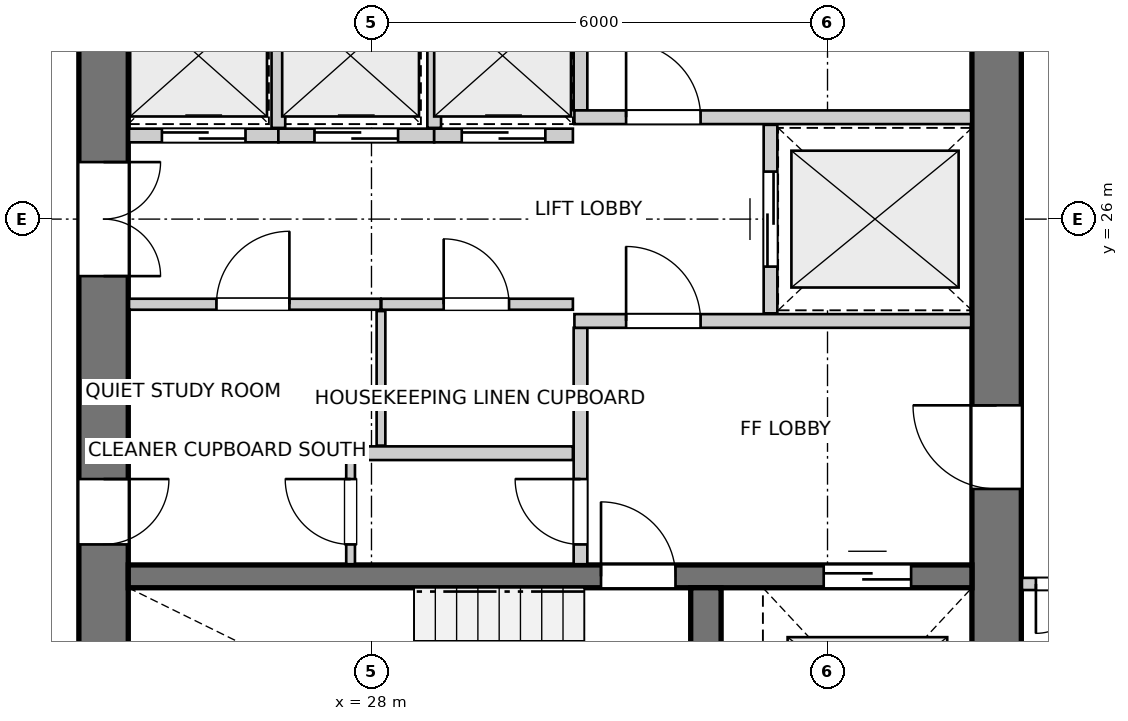
"""IFC4 building model, lengths in metres.
Left out: names, types, materials, properties, quantities, classifications, styles, units other than length and angle.
Written with IfcOpenShell. Run it as: python <this file> out.ifc"""

import sys

from ifc_helpers import new_model, si_unit, direction, frame, frame_2d, origin, place, context, subcontext, project, spatial, rectangle, extrude, source, transform, mapped, element, fill, save


model = new_model("IFC4")
c1 = context("Model", 3, precision=1e-05, world=origin(), true_north=direction((0.0, 1.0)))
c2 = subcontext(c1, "Body", "Model", "MODEL_VIEW")
j1 = project(units=[si_unit("LENGTHUNIT", "METRE"), si_unit("PLANEANGLEUNIT", "RADIAN")], contexts=[c1])
p1 = place(None, origin())
s1 = spatial("IfcSite", under=j1, at=p1, CompositionType="ELEMENT")
p2 = place(p1, origin())
s2 = spatial("IfcBuilding", under=s1, at=p2, CompositionType="ELEMENT")
p3 = place(p2, frame((0.0, 0.0, 145.8)))
s3 = spatial("IfcBuildingStorey", under=s2, at=p3, CompositionType="ELEMENT", Elevation=145.8)
p4 = place(p3, frame((24.475, 33.8, 0.0), z_axis=(0.0, 0.0, 1.0), x_axis=(0.0, -1.0, 0.0)))
e1 = element("IfcWall", 1, at=p4, inside=s3, PredefinedType="SHEAR", context=c2, shape_type="SweptSolid", body=[
    extrude(rectangle(XDim=15.6, YDim=0.65, at=frame_2d((7.8, 0.0))), origin(), (0.0, 0.0, 1.0), 2.95),
])
p5 = place(p4, frame((7.05, 0.0, 0.0)))
e2 = element("IfcOpeningElement", 2, at=p5, cuts=e1, PredefinedType="OPENING", context=c2, shape_type="SweptSolid", body=[
    extrude(rectangle(XDim=1.5, YDim=2.15, at=frame_2d((0.75, 1.075))), frame((0.0, 0.335, 0.0), z_axis=(0.0, -1.0, 0.0), x_axis=(1.0, 0.0, 0.0)), (0.0, 0.0, 1.0), 0.67),
])
p6 = place(p4, frame((3.52, 0.0, 0.0)))
e3 = element("IfcOpeningElement", 3, at=p6, cuts=e1, PredefinedType="OPENING", context=c2, shape_type="SweptSolid", body=[
    extrude(rectangle(XDim=0.86, YDim=2.05, at=frame_2d((0.43, 1.025))), frame((0.0, 0.335, 0.0), z_axis=(0.0, -1.0, 0.0), x_axis=(1.0, 0.0, 0.0)), (0.0, 0.0, 1.0), 0.67),
])
p7 = place(p4, frame((11.22, 0.0, 0.0)))
e4 = element("IfcOpeningElement", 4, at=p7, cuts=e1, PredefinedType="OPENING", context=c2, shape_type="SweptSolid", body=[
    extrude(rectangle(XDim=0.86, YDim=2.05, at=frame_2d((0.43, 1.025))), frame((0.0, 0.335, 0.0), z_axis=(0.0, -1.0, 0.0), x_axis=(1.0, 0.0, 0.0)), (0.0, 0.0, 1.0), 0.67),
])
p8 = place(p3, frame((36.225, 18.2, 0.0), z_axis=(0.0, 0.0, 1.0), x_axis=(0.0, 1.0, 0.0)))
e5 = element("IfcWall", 5, at=p8, inside=s3, PredefinedType="SHEAR", context=c2, shape_type="SweptSolid", body=[
    extrude(rectangle(XDim=15.6, YDim=0.65, at=frame_2d((7.8, 0.0))), origin(), (0.0, 0.0, 1.0), 2.95),
])
p9 = place(p8, frame((4.25, 0.0, 0.0)))
e6 = element("IfcOpeningElement", 6, at=p9, cuts=e5, PredefinedType="OPENING", context=c2, shape_type="SweptSolid", body=[
    extrude(rectangle(XDim=1.1, YDim=2.15, at=frame_2d((0.55, 1.075))), frame((0.0, 0.335, 0.0), z_axis=(0.0, -1.0, 0.0), x_axis=(1.0, 0.0, 0.0)), (0.0, 0.0, 1.0), 0.67),
])
p10 = place(p8, frame((10.25, 0.0, 0.0)))
e7 = element("IfcOpeningElement", 7, at=p10, cuts=e5, PredefinedType="OPENING", context=c2, shape_type="SweptSolid", body=[
    extrude(rectangle(XDim=1.1, YDim=2.15, at=frame_2d((0.55, 1.075))), frame((0.0, 0.335, 0.0), z_axis=(0.0, -1.0, 0.0), x_axis=(1.0, 0.0, 0.0)), (0.0, 0.0, 1.0), 0.67),
])
p11 = place(p3, frame((24.8, 21.3, 0.0), z_axis=(0.0, 0.0, 1.0), x_axis=(1.0, 0.0, 0.0)))
e8 = element("IfcWall", 8, at=p11, inside=s3, PredefinedType="SHEAR", context=c2, shape_type="SweptSolid", body=[
    extrude(rectangle(XDim=11.1, YDim=0.3, at=frame_2d((5.55, 0.0))), origin(), (0.0, 0.0, 1.0), 2.95),
])
p12 = place(p11, frame((6.22, 0.0, 0.0)))
e9 = element("IfcOpeningElement", 9, at=p12, cuts=e8, PredefinedType="OPENING", context=c2, shape_type="SweptSolid", body=[
    extrude(rectangle(XDim=0.98, YDim=2.15, at=frame_2d((0.49, 1.075))), frame((0.0, 0.16, 0.0), z_axis=(0.0, -1.0, 0.0), x_axis=(1.0, 0.0, 0.0)), (0.0, 0.0, 1.0), 0.32),
])
p13 = place(p11, frame((9.15, 0.0, 0.0)))
e10 = element("IfcOpeningElement", 10, at=p13, cuts=e8, PredefinedType="OPENING", context=c2, shape_type="SweptSolid", body=[
    extrude(rectangle(XDim=1.15, YDim=2.15, at=frame_2d((0.575, 1.075))), frame((0.0, 0.16, 0.0), z_axis=(0.0, -1.0, 0.0), x_axis=(1.0, 0.0, 0.0)), (0.0, 0.0, 1.0), 0.32),
])
p14 = place(p3, frame((32.4, 18.2, 0.0), z_axis=(0.0, 0.0, 1.0), x_axis=(0.0, 1.0, 0.0)))
e11 = element("IfcWall", 11, at=p14, inside=s3, PredefinedType="SHEAR", context=c2, shape_type="SweptSolid", body=[
    extrude(rectangle(XDim=2.95, YDim=0.4, at=frame_2d((1.475, 0.0))), origin(), (0.0, 0.0, 1.0), 2.95),
])
p15 = place(p3, frame((30.75, 21.46, 0.0), z_axis=(0.0, 0.0, 1.0), x_axis=(0.0, 1.0, 0.0)))
e12 = element("IfcWall", 12, at=p15, inside=s3, PredefinedType="PARTITIONING", context=c2, shape_type="SweptSolid", body=[
    extrude(rectangle(XDim=3.11, YDim=0.18, at=frame_2d((1.555, 0.0))), origin(), (0.0, 0.0, 1.0), 2.95),
])
p16 = place(p15, frame((0.26, 0.0, 0.0)))
e13 = element("IfcOpeningElement", 13, at=p16, cuts=e12, PredefinedType="OPENING", context=c2, shape_type="SweptSolid", body=[
    extrude(rectangle(XDim=0.86, YDim=2.05, at=frame_2d((0.43, 1.025))), frame((0.0, 0.1, 0.0), z_axis=(0.0, -1.0, 0.0), x_axis=(1.0, 0.0, 0.0)), (0.0, 0.0, 1.0), 0.2),
])
p17 = place(p3, frame((30.67, 24.66, 0.0), z_axis=(0.0, 0.0, 1.0), x_axis=(1.0, 0.0, 0.0)))
e14 = element("IfcWall", 14, at=p17, inside=s3, PredefinedType="PARTITIONING", context=c2, shape_type="SweptSolid", body=[
    extrude(rectangle(XDim=5.22, YDim=0.18, at=frame_2d((2.61, 0.0))), origin(), (0.0, 0.0, 1.0), 2.95),
])
p18 = place(p17, frame((0.68, 0.0, 0.0)))
e15 = element("IfcOpeningElement", 15, at=p18, cuts=e14, PredefinedType="OPENING", context=c2, shape_type="SweptSolid", body=[
    extrude(rectangle(XDim=0.98, YDim=2.15, at=frame_2d((0.49, 1.075))), frame((0.0, 0.1, 0.0), z_axis=(0.0, -1.0, 0.0), x_axis=(1.0, 0.0, 0.0)), (0.0, 0.0, 1.0), 0.2),
])
p19 = place(p3, frame((30.75, 27.43, 0.0), z_axis=(0.0, 0.0, 1.0), x_axis=(0.0, 1.0, 0.0)))
e16 = element("IfcWall", 16, at=p19, inside=s3, PredefinedType="PARTITIONING", context=c2, shape_type="SweptSolid", body=[
    extrude(rectangle(XDim=3.11, YDim=0.18, at=frame_2d((1.555, 0.0))), origin(), (0.0, 0.0, 1.0), 2.95),
])
p20 = place(p19, frame((1.98, 0.0, 0.0)))
e17 = element("IfcOpeningElement", 17, at=p20, cuts=e16, PredefinedType="OPENING", context=c2, shape_type="SweptSolid", body=[
    extrude(rectangle(XDim=0.86, YDim=2.05, at=frame_2d((0.43, 1.025))), frame((0.0, 0.1, 0.0), z_axis=(0.0, -1.0, 0.0), x_axis=(1.0, 0.0, 0.0)), (0.0, 0.0, 1.0), 0.2),
])
p21 = place(p3, frame((30.67, 27.34, 0.0), z_axis=(0.0, 0.0, 1.0), x_axis=(1.0, 0.0, 0.0)))
e18 = element("IfcWall", 18, at=p21, inside=s3, PredefinedType="PARTITIONING", context=c2, shape_type="SweptSolid", body=[
    extrude(rectangle(XDim=5.22, YDim=0.18, at=frame_2d((2.61, 0.0))), origin(), (0.0, 0.0, 1.0), 2.95),
])
p22 = place(p21, frame((0.68, 0.0, 0.0)))
e19 = element("IfcOpeningElement", 19, at=p22, cuts=e18, PredefinedType="OPENING", context=c2, shape_type="SweptSolid", body=[
    extrude(rectangle(XDim=0.98, YDim=2.15, at=frame_2d((0.49, 1.075))), frame((0.0, 0.1, 0.0), z_axis=(0.0, -1.0, 0.0), x_axis=(1.0, 0.0, 0.0)), (0.0, 0.0, 1.0), 0.2),
])
p23 = place(p3, frame((33.25, 24.76, 0.0), z_axis=(0.0, 0.0, 1.0), x_axis=(0.0, 1.0, 0.0)))
e20 = element("IfcWall", 20, at=p23, inside=s3, PredefinedType="PARTITIONING", context=c2, shape_type="SweptSolid", body=[
    extrude(rectangle(XDim=2.48, YDim=0.18, at=frame_2d((1.24, 0.0))), origin(), (0.0, 0.0, 1.0), 2.95),
])
p24 = place(p23, frame((0.615, 0.0, 0.0)))
e21 = element("IfcOpeningElement", 21, at=p24, cuts=e20, PredefinedType="OPENING", context=c2, shape_type="SweptSolid", body=[
    extrude(rectangle(XDim=1.25, YDim=2.15, at=frame_2d((0.625, 1.075))), frame((0.0, 0.1, 0.0), z_axis=(0.0, -1.0, 0.0), x_axis=(1.0, 0.0, 0.0)), (0.0, 0.0, 1.0), 0.2),
])
p25 = place(p3, frame((24.81, 22.92, 0.0), z_axis=(0.0, 0.0, 1.0), x_axis=(1.0, 0.0, 0.0)))
e22 = element("IfcWall", 22, at=p25, inside=s3, PredefinedType="PARTITIONING", context=c2, shape_type="SweptSolid", body=[
    extrude(rectangle(XDim=5.84, YDim=0.18, at=frame_2d((2.92, 0.0))), origin(), (0.0, 0.0, 1.0), 2.95),
])
p26 = place(p3, frame((24.81, 24.88, 0.0), z_axis=(0.0, 0.0, 1.0), x_axis=(1.0, 0.0, 0.0)))
e23 = element("IfcWall", 23, at=p26, inside=s3, PredefinedType="PARTITIONING", context=c2, shape_type="SweptSolid", body=[
    extrude(rectangle(XDim=3.31, YDim=0.145, at=frame_2d((1.655, 0.0))), origin(), (0.0, 0.0, 1.0), 2.95),
])
p27 = place(p26, frame((1.15, 0.0, 0.0)))
e24 = element("IfcOpeningElement", 24, at=p27, cuts=e23, PredefinedType="OPENING", context=c2, shape_type="SweptSolid", body=[
    extrude(rectangle(XDim=0.96, YDim=2.1, at=frame_2d((0.48, 1.05))), frame((0.0, 0.083, 0.0), z_axis=(0.0, -1.0, 0.0), x_axis=(1.0, 0.0, 0.0)), (0.0, 0.0, 1.0), 0.165),
])
p28 = place(p3, frame((28.13, 24.88, 0.0), z_axis=(0.0, 0.0, 1.0), x_axis=(1.0, 0.0, 0.0)))
e25 = element("IfcWall", 25, at=p28, inside=s3, PredefinedType="PARTITIONING", context=c2, shape_type="SweptSolid", body=[
    extrude(rectangle(XDim=2.52, YDim=0.145, at=frame_2d((1.26, 0.0))), origin(), (0.0, 0.0, 1.0), 2.95),
])
p29 = place(p28, frame((0.82, 0.0, 0.0)))
e26 = element("IfcOpeningElement", 26, at=p29, cuts=e25, PredefinedType="OPENING", context=c2, shape_type="SweptSolid", body=[
    extrude(rectangle(XDim=0.86, YDim=2.05, at=frame_2d((0.43, 1.025))), frame((0.0, 0.083, 0.0), z_axis=(0.0, -1.0, 0.0), x_axis=(1.0, 0.0, 0.0)), (0.0, 0.0, 1.0), 0.165),
])
p30 = place(p3, frame((28.125, 23.02, 0.0), z_axis=(0.0, 0.0, 1.0), x_axis=(0.0, 1.0, 0.0)))
e27 = element("IfcWall", 27, at=p30, inside=s3, PredefinedType="PARTITIONING", context=c2, shape_type="SweptSolid", body=[
    extrude(rectangle(XDim=1.77, YDim=0.115, at=frame_2d((0.885, 0.0))), origin(), (0.0, 0.0, 1.0), 2.95),
])
p31 = place(p3, frame((24.81, 27.1, 0.0), z_axis=(0.0, 0.0, 1.0), x_axis=(1.0, 0.0, 0.0)))
e28 = element("IfcWall", 28, at=p31, inside=s3, PredefinedType="PARTITIONING", context=c2, shape_type="SweptSolid", body=[
    extrude(rectangle(XDim=1.965, YDim=0.18, at=frame_2d((0.982, 0.0))), origin(), (0.0, 0.0, 1.0), 2.95),
])
p32 = place(p31, frame((0.433, 0.0, 0.0)))
e29 = element("IfcOpeningElement", 29, at=p32, cuts=e28, PredefinedType="OPENING", context=c2, shape_type="SweptSolid", body=[
    extrude(rectangle(XDim=1.1, YDim=2.15, at=frame_2d((0.55, 1.075))), frame((0.0, 0.1, 0.0), z_axis=(0.0, -1.0, 0.0), x_axis=(1.0, 0.0, 0.0)), (0.0, 0.0, 1.0), 0.2),
])
p33 = place(p3, frame((26.775, 27.1, 0.0), z_axis=(0.0, 0.0, 1.0), x_axis=(1.0, 0.0, 0.0)))
e30 = element("IfcWall", 30, at=p33, inside=s3, PredefinedType="PARTITIONING", context=c2, shape_type="SweptSolid", body=[
    extrude(rectangle(XDim=2.05, YDim=0.18, at=frame_2d((1.025, 0.0))), origin(), (0.0, 0.0, 1.0), 2.95),
])
p34 = place(p33, frame((0.475, 0.0, 0.0)))
e31 = element("IfcOpeningElement", 31, at=p34, cuts=e30, PredefinedType="OPENING", context=c2, shape_type="SweptSolid", body=[
    extrude(rectangle(XDim=1.1, YDim=2.15, at=frame_2d((0.55, 1.075))), frame((0.0, 0.1, 0.0), z_axis=(0.0, -1.0, 0.0), x_axis=(1.0, 0.0, 0.0)), (0.0, 0.0, 1.0), 0.2),
])
p35 = place(p3, frame((26.775, 27.2, 0.0), z_axis=(0.0, 0.0, 1.0), x_axis=(0.0, 1.0, 0.0)))
e32 = element("IfcWall", 32, at=p35, inside=s3, PredefinedType="PARTITIONING", context=c2, shape_type="SweptSolid", body=[
    extrude(rectangle(XDim=1.78, YDim=0.18, at=frame_2d((0.89, 0.0))), origin(), (0.0, 0.0, 1.0), 2.95),
])
p36 = place(p3, frame((28.825, 27.1, 0.0), z_axis=(0.0, 0.0, 1.0), x_axis=(1.0, 0.0, 0.0)))
e33 = element("IfcWall", 33, at=p36, inside=s3, PredefinedType="PARTITIONING", context=c2, shape_type="SweptSolid", body=[
    extrude(rectangle(XDim=1.825, YDim=0.18, at=frame_2d((0.913, 0.0))), origin(), (0.0, 0.0, 1.0), 2.95),
])
p37 = place(p36, frame((0.363, 0.0, 0.0)))
e34 = element("IfcOpeningElement", 34, at=p37, cuts=e33, PredefinedType="OPENING", context=c2, shape_type="SweptSolid", body=[
    extrude(rectangle(XDim=1.1, YDim=2.15, at=frame_2d((0.55, 1.075))), frame((0.0, 0.1, 0.0), z_axis=(0.0, -1.0, 0.0), x_axis=(1.0, 0.0, 0.0)), (0.0, 0.0, 1.0), 0.2),
])
p38 = place(p3, frame((28.825, 27.2, 0.0), z_axis=(0.0, 0.0, 1.0), x_axis=(0.0, 1.0, 0.0)))
e35 = element("IfcWall", 35, at=p38, inside=s3, PredefinedType="PARTITIONING", context=c2, shape_type="SweptSolid", body=[
    extrude(rectangle(XDim=1.78, YDim=0.18, at=frame_2d((0.89, 0.0))), origin(), (0.0, 0.0, 1.0), 2.95),
])
p39 = place(p3, frame((27.725, 21.46, 0.0), z_axis=(0.0, 0.0, 1.0), x_axis=(0.0, 1.0, 0.0)))
e36 = element("IfcWall", 36, at=p39, inside=s3, PredefinedType="PARTITIONING", context=c2, shape_type="SweptSolid", body=[
    extrude(rectangle(XDim=1.38, YDim=0.115, at=frame_2d((0.69, 0.0))), origin(), (0.0, 0.0, 1.0), 2.95),
])
p40 = place(p39, frame((0.26, 0.0, 0.0)))
e37 = element("IfcOpeningElement", 37, at=p40, cuts=e36, PredefinedType="OPENING", context=c2, shape_type="SweptSolid", body=[
    extrude(rectangle(XDim=0.86, YDim=2.05, at=frame_2d((0.43, 1.025))), frame((0.0, 0.067, 0.0), z_axis=(0.0, -1.0, 0.0), x_axis=(1.0, 0.0, 0.0)), (0.0, 0.0, 1.0), 0.135),
])
p41 = place(p3, frame((38.242, 21.2, 0.0), z_axis=(0.0, 0.0, 1.0), x_axis=(-1.0, 0.0, 0.0)))
e38 = element("IfcWall", 38, at=p41, inside=s3, PredefinedType="PARTITIONING", context=c2, shape_type="SweptSolid", body=[
    extrude(rectangle(XDim=1.684, YDim=0.16, at=frame_2d((0.842, 0.0))), origin(), (0.0, 0.0, 1.0), 2.95),
])
p42 = place(p41, frame((0.2, 0.0, 0.0)))
e39 = element("IfcOpeningElement", 39, at=p42, cuts=e38, PredefinedType="OPENING", context=c2, shape_type="SweptSolid", body=[
    extrude(rectangle(XDim=1.3, YDim=2.1, at=frame_2d((0.65, 1.05))), frame((0.0, 0.09, 0.0), z_axis=(0.0, -1.0, 0.0), x_axis=(1.0, 0.0, 0.0)), (0.0, 0.0, 1.0), 0.18),
])
m1 = source(origin(), c2, "Body", "SweptSolid", [
    extrude(rectangle(XDim=0.98, YDim=2.15, at=frame_2d((0.49, 1.075))), frame((0.0, 0.025, 0.0), z_axis=(0.0, -1.0, 0.0), x_axis=(1.0, 0.0, 0.0)), (0.0, 0.0, 1.0), 0.05),
])
p43 = place(p12, origin())
e40 = element("IfcDoor", 40, at=p43, inside=s3, OperationType="SINGLE_SWING_LEFT", PredefinedType="DOOR", context=c2, shape_type="MappedRepresentation", body=[
    mapped(m1, transform((0.0, 0.0, 0.0), x_axis=(1.0, 0.0, 0.0), y_axis=(0.0, 1.0, 0.0), z_axis=(0.0, 0.0, 1.0), scale=1.0)),
])
fill(e9, e40)
m2 = source(origin(), c2, "Body", "SweptSolid", [
    extrude(rectangle(XDim=1.15, YDim=2.15, at=frame_2d((0.575, 1.075))), frame((0.0, 0.025, 0.0), z_axis=(0.0, -1.0, 0.0), x_axis=(1.0, 0.0, 0.0)), (0.0, 0.0, 1.0), 0.05),
])
p44 = place(p13, origin())
e41 = element("IfcDoor", 41, at=p44, inside=s3, OperationType="DOUBLE_DOOR_SLIDING", PredefinedType="DOOR", context=c2, shape_type="MappedRepresentation", body=[
    mapped(m2, transform((0.0, 0.0, 0.0), x_axis=(1.0, 0.0, 0.0), y_axis=(0.0, 1.0, 0.0), z_axis=(0.0, 0.0, 1.0), scale=1.0)),
])
fill(e10, e41)
m3 = source(origin(), c2, "Body", "SweptSolid", [
    extrude(rectangle(XDim=1.1, YDim=2.15, at=frame_2d((0.55, 1.075))), frame((0.0, 0.025, 0.0), z_axis=(0.0, -1.0, 0.0), x_axis=(1.0, 0.0, 0.0)), (0.0, 0.0, 1.0), 0.05),
])
p45 = place(p9, origin())
e42 = element("IfcDoor", 42, at=p45, inside=s3, OperationType="SINGLE_SWING_RIGHT", PredefinedType="DOOR", context=c2, shape_type="MappedRepresentation", body=[
    mapped(m3, transform((0.0, 0.0, 0.0), x_axis=(1.0, 0.0, 0.0), y_axis=(0.0, 1.0, 0.0), z_axis=(0.0, 0.0, 1.0), scale=1.0)),
])
fill(e6, e42)
m4 = source(origin(), c2, "Body", "SweptSolid", [
    extrude(rectangle(XDim=1.5, YDim=2.15, at=frame_2d((0.75, 1.075))), frame((0.0, 0.025, 0.0), z_axis=(0.0, -1.0, 0.0), x_axis=(1.0, 0.0, 0.0)), (0.0, 0.0, 1.0), 0.05),
])
p46 = place(p5, origin())
e43 = element("IfcDoor", 43, at=p46, inside=s3, OperationType="DOUBLE_DOOR_SINGLE_SWING", PredefinedType="DOOR", context=c2, shape_type="MappedRepresentation", body=[
    mapped(m4, transform((0.0, 0.0, 0.0), x_axis=(1.0, 0.0, 0.0), y_axis=(0.0, 1.0, 0.0), z_axis=(0.0, 0.0, 1.0), scale=1.0)),
])
fill(e2, e43)
m5 = source(origin(), c2, "Body", "SweptSolid", [
    extrude(rectangle(XDim=0.86, YDim=2.05, at=frame_2d((0.43, 1.025))), frame((0.0, 0.025, 0.0), z_axis=(0.0, -1.0, 0.0), x_axis=(1.0, 0.0, 0.0)), (0.0, 0.0, 1.0), 0.05),
])
p47 = place(p7, origin())
e44 = element("IfcDoor", 44, at=p47, inside=s3, OperationType="SINGLE_SWING_LEFT", PredefinedType="DOOR", context=c2, shape_type="MappedRepresentation", body=[
    mapped(m5, transform((0.0, 0.0, 0.0), x_axis=(1.0, 0.0, 0.0), y_axis=(0.0, 1.0, 0.0), z_axis=(0.0, 0.0, 1.0), scale=1.0)),
])
fill(e4, e44)
p48 = place(p16, origin())
e45 = element("IfcDoor", 45, at=p48, inside=s3, OperationType="SINGLE_SWING_RIGHT", PredefinedType="DOOR", context=c2, shape_type="MappedRepresentation", body=[
    mapped(m5, transform((0.0, 0.0, 0.0), x_axis=(1.0, 0.0, 0.0), y_axis=(0.0, 1.0, 0.0), z_axis=(0.0, 0.0, 1.0), scale=1.0)),
])
fill(e13, e45)
p49 = place(p18, origin())
e46 = element("IfcDoor", 46, at=p49, inside=s3, OperationType="SINGLE_SWING_LEFT", PredefinedType="DOOR", context=c2, shape_type="MappedRepresentation", body=[
    mapped(m1, transform((0.0, 0.0, 0.0), x_axis=(1.0, 0.0, 0.0), y_axis=(0.0, 1.0, 0.0), z_axis=(0.0, 0.0, 1.0), scale=1.0)),
])
fill(e15, e46)
p50 = place(p22, origin())
e47 = element("IfcDoor", 47, at=p50, inside=s3, OperationType="SINGLE_SWING_LEFT", PredefinedType="DOOR", context=c2, shape_type="MappedRepresentation", body=[
    mapped(m1, transform((0.0, 0.0, 0.0), x_axis=(1.0, 0.0, 0.0), y_axis=(0.0, 1.0, 0.0), z_axis=(0.0, 0.0, 1.0), scale=1.0)),
])
fill(e19, e47)
m6 = source(origin(), c2, "Body", "SweptSolid", [
    extrude(rectangle(XDim=1.25, YDim=2.15, at=frame_2d((0.625, 1.075))), frame((0.0, 0.025, 0.0), z_axis=(0.0, -1.0, 0.0), x_axis=(1.0, 0.0, 0.0)), (0.0, 0.0, 1.0), 0.05),
])
p51 = place(p24, origin())
e48 = element("IfcDoor", 48, at=p51, inside=s3, OperationType="DOUBLE_DOOR_SLIDING", PredefinedType="DOOR", context=c2, shape_type="MappedRepresentation", body=[
    mapped(m6, transform((0.0, 0.0, 0.0), x_axis=(1.0, 0.0, 0.0), y_axis=(0.0, 1.0, 0.0), z_axis=(0.0, 0.0, 1.0), scale=1.0)),
])
fill(e21, e48)
m7 = source(origin(), c2, "Body", "SweptSolid", [
    extrude(rectangle(XDim=0.96, YDim=2.1, at=frame_2d((0.48, 1.05))), frame((0.0, 0.025, 0.0), z_axis=(0.0, -1.0, 0.0), x_axis=(1.0, 0.0, 0.0)), (0.0, 0.0, 1.0), 0.05),
])
p52 = place(p27, origin())
e49 = element("IfcDoor", 49, at=p52, inside=s3, OperationType="SINGLE_SWING_RIGHT", PredefinedType="DOOR", context=c2, shape_type="MappedRepresentation", body=[
    mapped(m7, transform((0.0, 0.0, 0.0), x_axis=(1.0, 0.0, 0.0), y_axis=(0.0, 1.0, 0.0), z_axis=(0.0, 0.0, 1.0), scale=1.0)),
])
fill(e24, e49)
p53 = place(p29, origin())
e50 = element("IfcDoor", 50, at=p53, inside=s3, OperationType="SINGLE_SWING_LEFT", PredefinedType="DOOR", context=c2, shape_type="MappedRepresentation", body=[
    mapped(m5, transform((0.0, 0.0, 0.0), x_axis=(1.0, 0.0, 0.0), y_axis=(0.0, 1.0, 0.0), z_axis=(0.0, 0.0, 1.0), scale=1.0)),
])
fill(e26, e50)
p54 = place(p32, origin())
e51 = element("IfcDoor", 51, at=p54, inside=s3, OperationType="DOUBLE_DOOR_SLIDING", PredefinedType="DOOR", context=c2, shape_type="MappedRepresentation", body=[
    mapped(m3, transform((0.0, 0.0, 0.0), x_axis=(1.0, 0.0, 0.0), y_axis=(0.0, 1.0, 0.0), z_axis=(0.0, 0.0, 1.0), scale=1.0)),
])
fill(e29, e51)
p55 = place(p34, origin())
e52 = element("IfcDoor", 52, at=p55, inside=s3, OperationType="DOUBLE_DOOR_SLIDING", PredefinedType="DOOR", context=c2, shape_type="MappedRepresentation", body=[
    mapped(m3, transform((0.0, 0.0, 0.0), x_axis=(1.0, 0.0, 0.0), y_axis=(0.0, 1.0, 0.0), z_axis=(0.0, 0.0, 1.0), scale=1.0)),
])
fill(e31, e52)
p56 = place(p37, origin())
e53 = element("IfcDoor", 53, at=p56, inside=s3, OperationType="DOUBLE_DOOR_SLIDING", PredefinedType="DOOR", context=c2, shape_type="MappedRepresentation", body=[
    mapped(m3, transform((0.0, 0.0, 0.0), x_axis=(1.0, 0.0, 0.0), y_axis=(0.0, 1.0, 0.0), z_axis=(0.0, 0.0, 1.0), scale=1.0)),
])
fill(e34, e53)
p57 = place(p40, origin())
e54 = element("IfcDoor", 54, at=p57, inside=s3, OperationType="SINGLE_SWING_RIGHT", PredefinedType="DOOR", context=c2, shape_type="MappedRepresentation", body=[
    mapped(m5, transform((0.0, 0.0, 0.0), x_axis=(1.0, 0.0, 0.0), y_axis=(0.0, 1.0, 0.0), z_axis=(0.0, 0.0, 1.0), scale=1.0)),
])
fill(e37, e54)
m8 = source(origin(), c2, "Body", "SweptSolid", [
    extrude(rectangle(XDim=1.3, YDim=2.1, at=frame_2d((0.65, 1.05))), frame((0.0, 0.025, 0.0), z_axis=(0.0, -1.0, 0.0), x_axis=(1.0, 0.0, 0.0)), (0.0, 0.0, 1.0), 0.05),
])
p58 = place(p42, origin())
e55 = element("IfcDoor", 55, at=p58, inside=s3, OperationType="DOUBLE_DOOR_SINGLE_SWING", PredefinedType="DOOR", context=c2, shape_type="MappedRepresentation", body=[
    mapped(m8, transform((0.0, 0.0, 0.0), x_axis=(1.0, 0.0, 0.0), y_axis=(0.0, 1.0, 0.0), z_axis=(0.0, 0.0, 1.0), scale=1.0)),
])
fill(e39, e55)
save(model, sys.argv[1])
